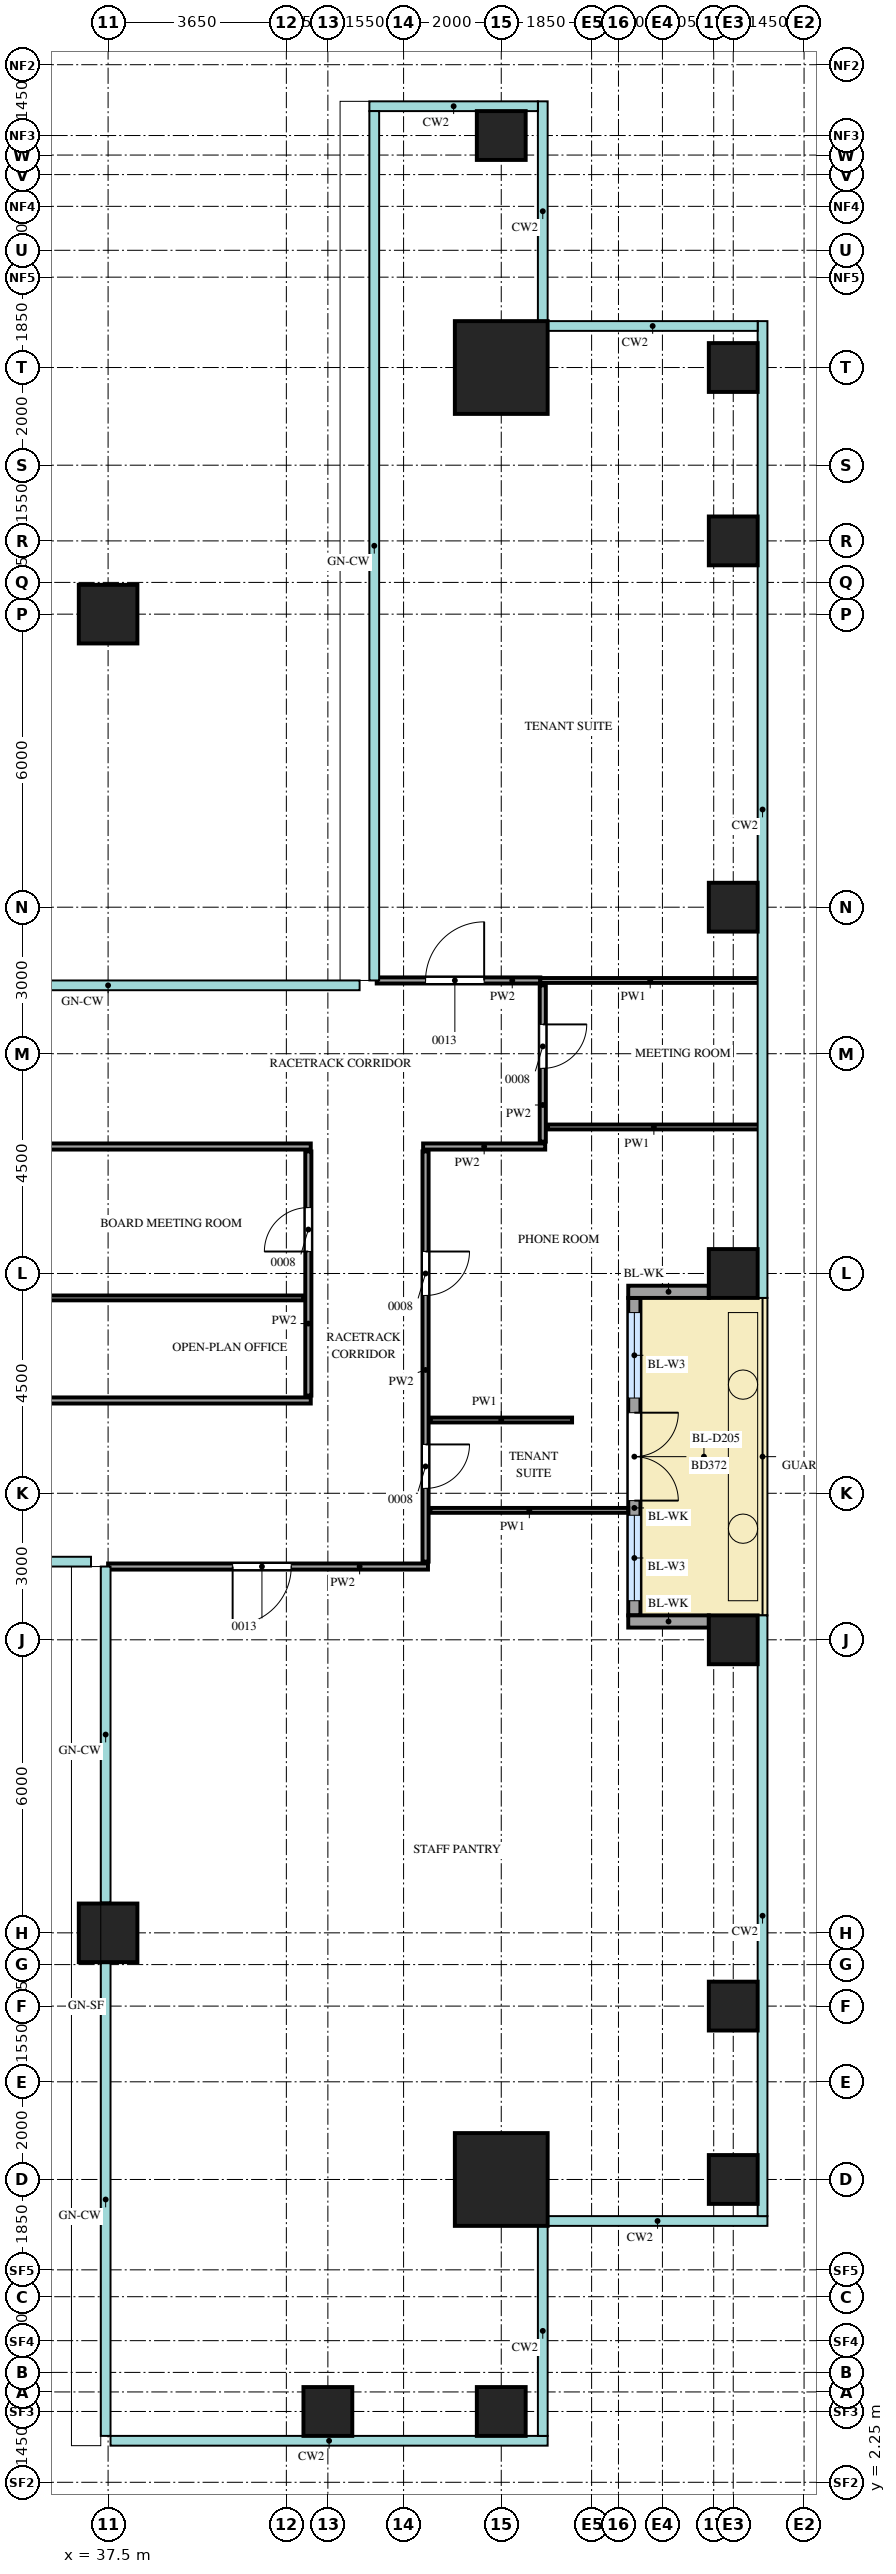
"""IFC4 building model, lengths in metres.
Left out: names, types, materials, properties, quantities, classifications, styles, units other than length and angle.
Written with IfcOpenShell. Run it as: python <this file> out.ifc"""

import sys

from ifc_helpers import new_model, si_unit, direction, frame, frame_2d, origin, origin_2d, place, context, subcontext, project, spatial, rectangle, extrude, source, transform, mapped, element, fill, save


model = new_model("IFC4")
c1 = context("Model", 3, precision=1e-05, world=origin(), true_north=direction((0.0, 1.0)))
c2 = subcontext(c1, "Body", "Model", "MODEL_VIEW")
j1 = project(units=[si_unit("LENGTHUNIT", "METRE"), si_unit("PLANEANGLEUNIT", "RADIAN")], contexts=[c1])
p1 = place(None, origin())
s1 = spatial("IfcSite", under=j1, at=p1, CompositionType="ELEMENT")
p2 = place(p1, origin())
s2 = spatial("IfcBuilding", under=s1, at=p2, CompositionType="ELEMENT")
p3 = place(p2, frame((0.0, 0.0, 172.7)))
s3 = spatial("IfcBuildingStorey", under=s2, at=p3, CompositionType="ELEMENT", Elevation=172.7)
m1 = source(origin(), c2, "Body", "SweptSolid", [
    extrude(rectangle(XDim=1.9, YDim=1.9, at=origin_2d()), origin(), (0.0, 0.0, 1.0), 4.0),
])
for number, where, z_axis, x_axis in (
    (1, (45.55, 45.55, 0.0), (0.0, 0.0, 1.0), (1.0, 0.0, 0.0)),
    (2, (45.55, 8.45, 0.0), (0.0, 0.0, 1.0), (1.0, 0.0, 0.0)),
):
    element("IfcColumn", number, at=place(p3, frame(where, z_axis=z_axis, x_axis=x_axis)), inside=s3, PredefinedType="COLUMN", context=c2, shape_type="MappedRepresentation", body=[
        mapped(m1, transform((0.0, 0.0, 0.0))),
    ])
m2 = source(origin(), c2, "Body", "SweptSolid", [
    extrude(rectangle(XDim=1.0, YDim=1.0, at=origin_2d()), origin(), (0.0, 0.0, 1.0), 3.75),
])
for number, where, z_axis, x_axis in (
    (3, (42.0, 3.7, 0.0), (0.0, 0.0, 1.0), (1.0, 0.0, 0.0)),
    (4, (45.55, 3.7, 0.0), (0.0, 0.0, 1.0), (1.0, 0.0, 0.0)),
    (5, (50.3, 8.45, 0.0), (0.0, 0.0, 1.0), (1.0, 0.0, 0.0)),
    (6, (50.3, 12.0, 0.0), (0.0, 0.0, 1.0), (1.0, 0.0, 0.0)),
    (7, (50.3, 19.5, 0.0), (0.0, 0.0, 1.0), (1.0, 0.0, 0.0)),
    (8, (50.3, 27.0, 0.0), (0.0, 0.0, 1.0), (1.0, 0.0, 0.0)),
    (9, (50.3, 34.5, 0.0), (0.0, 0.0, 1.0), (1.0, 0.0, 0.0)),
    (10, (50.3, 42.0, 0.0), (0.0, 0.0, 1.0), (1.0, 0.0, 0.0)),
    (11, (50.3, 45.55, 0.0), (0.0, 0.0, 1.0), (1.0, 0.0, 0.0)),
    (12, (45.55, 50.3, 0.0), (0.0, 0.0, 1.0), (1.0, 0.0, 0.0)),
):
    element("IfcColumn", number, at=place(p3, frame(where, z_axis=z_axis, x_axis=x_axis)), inside=s3, PredefinedType="COLUMN", context=c2, shape_type="MappedRepresentation", body=[
        mapped(m2, transform((0.0, 0.0, 0.0))),
    ])
m3 = source(origin(), c2, "Body", "SweptSolid", [
    extrude(rectangle(XDim=1.2, YDim=1.2, at=origin_2d()), origin(), (0.0, 0.0, 1.0), 3.75),
])
p4 = place(p3, frame((37.5, 13.5, 0.0), z_axis=(0.0, 0.0, 1.0), x_axis=(1.0, 0.0, 0.0)))
e13 = element("IfcColumn", 13, at=p4, inside=s3, PredefinedType="COLUMN", context=c2, shape_type="MappedRepresentation", body=[
    mapped(m3, transform((0.0, 0.0, 0.0))),
])
m4 = source(origin(), c2, "Body", "SweptSolid", [
    extrude(rectangle(XDim=1.2, YDim=1.2, at=origin_2d()), origin(), (0.0, 0.0, 1.0), 4.0),
])
p5 = place(p3, frame((37.5, 40.5, 0.0), z_axis=(0.0, 0.0, 1.0), x_axis=(1.0, 0.0, 0.0)))
e14 = element("IfcColumn", 14, at=p5, inside=s3, PredefinedType="COLUMN", context=c2, shape_type="MappedRepresentation", body=[
    mapped(m4, transform((0.0, 0.0, 0.0))),
])
m5 = source(origin(), c2, "Body", "SweptSolid", [
    extrude(rectangle(XDim=6.5, YDim=0.25, at=frame_2d((3.25, 0.0))), origin(), (0.0, 0.0, 1.0), 3.15),
])
p6 = place(p3, frame((48.275, 20.0, 0.0), z_axis=(0.0, 0.0, 1.0), x_axis=(0.0, 1.0, 0.0)))
e15 = element("IfcWall", 15, at=p6, inside=s3, PredefinedType="SOLIDWALL", context=c2, shape_type="MappedRepresentation", body=[
    mapped(m5, transform((0.0, 0.0, 0.0))),
])
m6 = source(origin(), c2, "Body", "SweptSolid", [
    extrude(rectangle(XDim=1.75, YDim=2.4, at=frame_2d((0.875, 1.2))), frame((0.0, 0.135, 0.0), z_axis=(0.0, -1.0, 0.0), x_axis=(1.0, 0.0, 0.0)), (0.0, 0.0, 1.0), 0.27),
])
p7 = place(p6, frame((0.3, 0.0, 0.0)))
e16 = element("IfcOpeningElement", 16, at=p7, cuts=e15, PredefinedType="OPENING", context=c2, shape_type="MappedRepresentation", body=[
    mapped(m6, transform((0.0, 0.0, 0.0))),
])
p8 = place(p6, frame((4.45, 0.0, 0.0)))
e17 = element("IfcOpeningElement", 17, at=p8, cuts=e15, PredefinedType="OPENING", context=c2, shape_type="MappedRepresentation", body=[
    mapped(m6, transform((0.0, 0.0, 0.0))),
])
m7 = source(origin(), c2, "Body", "SweptSolid", [
    extrude(rectangle(XDim=1.8, YDim=2.4, at=frame_2d((0.9, 1.2))), frame((0.0, 0.135, 0.0), z_axis=(0.0, -1.0, 0.0), x_axis=(1.0, 0.0, 0.0)), (0.0, 0.0, 1.0), 0.27),
])
p9 = place(p6, frame((2.35, 0.0, 0.0)))
e18 = element("IfcOpeningElement", 18, at=p9, cuts=e15, PredefinedType="OPENING", context=c2, shape_type="MappedRepresentation", body=[
    mapped(m7, transform((0.0, 0.0, 0.0))),
])
m8 = source(origin(), c2, "Body", "SweptSolid", [
    extrude(rectangle(XDim=1.65, YDim=0.25, at=frame_2d((0.825, 0.0))), origin(), (0.0, 0.0, 1.0), 3.15),
])
for number, where, z_axis, x_axis in (
    (19, (49.8, 19.875, 0.0), (0.0, 0.0, 1.0), (-1.0, 0.0, 0.0)),
    (20, (49.8, 26.625, 0.0), (0.0, 0.0, 1.0), (-1.0, 0.0, 0.0)),
):
    element("IfcWall", number, at=place(p3, frame(where, z_axis=z_axis, x_axis=x_axis)), inside=s3, PredefinedType="SOLIDWALL", context=c2, shape_type="MappedRepresentation", body=[
        mapped(m8, transform((0.0, 0.0, 0.0))),
    ])
m9 = source(origin(), c2, "Body", "SweptSolid", [
    extrude(rectangle(XDim=6.55, YDim=0.125, at=frame_2d((3.275, 0.0))), origin(), (0.0, 0.0, 1.0), 3.8),
])
p10 = place(p3, frame((37.5, 21.0, 0.0), z_axis=(0.0, 0.0, 1.0), x_axis=(1.0, 0.0, 0.0)))
e21 = element("IfcWall", 21, at=p10, inside=s3, PredefinedType="PARTITIONING", context=c2, shape_type="MappedRepresentation", body=[
    mapped(m9, transform((0.0, 0.0, 0.0))),
])
m10 = source(origin(), c2, "Body", "SweptSolid", [
    extrude(rectangle(XDim=1.2, YDim=2.1, at=frame_2d((0.6, 1.05))), frame((0.0, 0.073, 0.0), z_axis=(0.0, -1.0, 0.0), x_axis=(1.0, 0.0, 0.0)), (0.0, 0.0, 1.0), 0.145),
])
p11 = place(p10, frame((2.55, 0.0, 0.0)))
e22 = element("IfcOpeningElement", 22, at=p11, cuts=e21, PredefinedType="OPENING", context=c2, shape_type="MappedRepresentation", body=[
    mapped(m10, transform((0.0, 0.0, 0.0))),
])
m11 = source(origin(), c2, "Body", "SweptSolid", [
    extrude(rectangle(XDim=8.4, YDim=0.125, at=frame_2d((4.2, 0.0))), origin(), (0.0, 0.0, 1.0), 3.8),
])
p12 = place(p3, frame((44.0, 21.1, 0.0), z_axis=(0.0, 0.0, 1.0), x_axis=(0.0, 1.0, 0.0)))
e23 = element("IfcWall", 23, at=p12, inside=s3, PredefinedType="PARTITIONING", context=c2, shape_type="MappedRepresentation", body=[
    mapped(m11, transform((0.0, 0.0, 0.0))),
])
m12 = source(origin(), c2, "Body", "SweptSolid", [
    extrude(rectangle(XDim=0.9, YDim=2.1, at=frame_2d((0.45, 1.05))), frame((0.0, 0.073, 0.0), z_axis=(0.0, -1.0, 0.0), x_axis=(1.0, 0.0, 0.0)), (0.0, 0.0, 1.0), 0.145),
])
p13 = place(p12, frame((1.5, 0.0, 0.0)))
e24 = element("IfcOpeningElement", 24, at=p13, cuts=e23, PredefinedType="OPENING", context=c2, shape_type="MappedRepresentation", body=[
    mapped(m12, transform((0.0, 0.0, 0.0))),
])
p14 = place(p12, frame((5.45, 0.0, 0.0)))
e25 = element("IfcOpeningElement", 25, at=p14, cuts=e23, PredefinedType="OPENING", context=c2, shape_type="MappedRepresentation", body=[
    mapped(m12, transform((0.0, 0.0, 0.0))),
])
m13 = source(origin(), c2, "Body", "SweptSolid", [
    extrude(rectangle(XDim=4.05, YDim=0.1, at=frame_2d((2.025, 0.0))), origin(), (0.0, 0.0, 1.0), 3.8),
])
p15 = place(p3, frame((44.1, 22.15, 0.0), z_axis=(0.0, 0.0, 1.0), x_axis=(1.0, 0.0, 0.0)))
e26 = element("IfcWall", 26, at=p15, inside=s3, PredefinedType="PARTITIONING", context=c2, shape_type="MappedRepresentation", body=[
    mapped(m13, transform((0.0, 0.0, 0.0))),
])
m14 = source(origin(), c2, "Body", "SweptSolid", [
    extrude(rectangle(XDim=2.9, YDim=0.1, at=frame_2d((1.45, 0.0))), origin(), (0.0, 0.0, 1.0), 3.8),
])
p16 = place(p3, frame((44.1, 24.0, 0.0), z_axis=(0.0, 0.0, 1.0), x_axis=(1.0, 0.0, 0.0)))
e27 = element("IfcWall", 27, at=p16, inside=s3, PredefinedType="PARTITIONING", context=c2, shape_type="MappedRepresentation", body=[
    mapped(m14, transform((0.0, 0.0, 0.0))),
])
m15 = source(origin(), c2, "Body", "SweptSolid", [
    extrude(rectangle(XDim=18.3, YDim=0.125, at=frame_2d((9.15, 0.0))), origin(), (0.0, 0.0, 1.0), 3.8),
])
p17 = place(p3, frame((23.35, 24.4, 0.0), z_axis=(0.0, 0.0, 1.0), x_axis=(1.0, 0.0, 0.0)))
e28 = element("IfcWall", 28, at=p17, inside=s3, PredefinedType="PARTITIONING", context=c2, shape_type="MappedRepresentation", body=[
    mapped(m15, transform((0.0, 0.0, 0.0))),
])
m16 = source(origin(), c2, "Body", "SweptSolid", [
    extrude(rectangle(XDim=5.0, YDim=0.125, at=frame_2d((2.5, 0.0))), origin(), (0.0, 0.0, 1.0), 3.8),
])
p18 = place(p3, frame((41.6, 24.5, 0.0), z_axis=(0.0, 0.0, 1.0), x_axis=(0.0, 1.0, 0.0)))
e29 = element("IfcWall", 29, at=p18, inside=s3, PredefinedType="PARTITIONING", context=c2, shape_type="MappedRepresentation", body=[
    mapped(m16, transform((0.0, 0.0, 0.0))),
])
p19 = place(p18, frame((2.95, 0.0, 0.0)))
e30 = element("IfcOpeningElement", 30, at=p19, cuts=e29, PredefinedType="OPENING", context=c2, shape_type="MappedRepresentation", body=[
    mapped(m12, transform((0.0, 0.0, 0.0))),
])
m17 = source(origin(), c2, "Body", "SweptSolid", [
    extrude(rectangle(XDim=18.0, YDim=0.1, at=frame_2d((9.0, 0.0))), origin(), (0.0, 0.0, 1.0), 3.8),
])
p20 = place(p3, frame((23.5, 26.5, 0.0), z_axis=(0.0, 0.0, 1.0), x_axis=(1.0, 0.0, 0.0)))
e31 = element("IfcWall", 31, at=p20, inside=s3, PredefinedType="PARTITIONING", context=c2, shape_type="MappedRepresentation", body=[
    mapped(m17, transform((0.0, 0.0, 0.0))),
])
p21 = place(p3, frame((23.35, 29.6, 0.0), z_axis=(0.0, 0.0, 1.0), x_axis=(1.0, 0.0, 0.0)))
e32 = element("IfcWall", 32, at=p21, inside=s3, PredefinedType="PARTITIONING", context=c2, shape_type="MappedRepresentation", body=[
    mapped(m15, transform((0.0, 0.0, 0.0))),
])
m18 = source(origin(), c2, "Body", "SweptSolid", [
    extrude(rectangle(XDim=2.5, YDim=0.125, at=frame_2d((1.25, 0.0))), origin(), (0.0, 0.0, 1.0), 3.8),
])
p22 = place(p3, frame((43.95, 29.6, 0.0), z_axis=(0.0, 0.0, 1.0), x_axis=(1.0, 0.0, 0.0)))
e33 = element("IfcWall", 33, at=p22, inside=s3, PredefinedType="PARTITIONING", context=c2, shape_type="MappedRepresentation", body=[
    mapped(m18, transform((0.0, 0.0, 0.0))),
])
m19 = source(origin(), c2, "Body", "SweptSolid", [
    extrude(rectangle(XDim=3.2, YDim=0.125, at=frame_2d((1.6, 0.0))), origin(), (0.0, 0.0, 1.0), 3.8),
])
p23 = place(p3, frame((46.4, 29.7, 0.0), z_axis=(0.0, 0.0, 1.0), x_axis=(0.0, 1.0, 0.0)))
e34 = element("IfcWall", 34, at=p23, inside=s3, PredefinedType="PARTITIONING", context=c2, shape_type="MappedRepresentation", body=[
    mapped(m19, transform((0.0, 0.0, 0.0))),
])
p24 = place(p23, frame((1.5, 0.0, 0.0)))
e35 = element("IfcOpeningElement", 35, at=p24, cuts=e34, PredefinedType="OPENING", context=c2, shape_type="MappedRepresentation", body=[
    mapped(m12, transform((0.0, 0.0, 0.0))),
])
m20 = source(origin(), c2, "Body", "SweptSolid", [
    extrude(rectangle(XDim=4.35, YDim=0.1, at=frame_2d((2.175, 0.0))), origin(), (0.0, 0.0, 1.0), 3.8),
])
p25 = place(p3, frame((46.5, 30.0, 0.0), z_axis=(0.0, 0.0, 1.0), x_axis=(1.0, 0.0, 0.0)))
e36 = element("IfcWall", 36, at=p25, inside=s3, PredefinedType="PARTITIONING", context=c2, shape_type="MappedRepresentation", body=[
    mapped(m20, transform((0.0, 0.0, 0.0))),
])
m21 = source(origin(), c2, "Body", "SweptSolid", [
    extrude(rectangle(XDim=3.35, YDim=0.125, at=frame_2d((1.675, 0.0))), origin(), (0.0, 0.0, 1.0), 3.8),
])
p26 = place(p3, frame((43.0, 33.0, 0.0), z_axis=(0.0, 0.0, 1.0), x_axis=(1.0, 0.0, 0.0)))
e37 = element("IfcWall", 37, at=p26, inside=s3, PredefinedType="PARTITIONING", context=c2, shape_type="MappedRepresentation", body=[
    mapped(m21, transform((0.0, 0.0, 0.0))),
])
p27 = place(p26, frame((1.0, 0.0, 0.0)))
e38 = element("IfcOpeningElement", 38, at=p27, cuts=e37, PredefinedType="OPENING", context=c2, shape_type="MappedRepresentation", body=[
    mapped(m10, transform((0.0, 0.0, 0.0))),
])
m22 = source(origin(), c2, "Body", "SweptSolid", [
    extrude(rectangle(XDim=4.5, YDim=0.1, at=frame_2d((2.25, 0.0))), origin(), (0.0, 0.0, 1.0), 3.8),
])
p28 = place(p3, frame((46.35, 33.0, 0.0), z_axis=(0.0, 0.0, 1.0), x_axis=(1.0, 0.0, 0.0)))
e39 = element("IfcWall", 39, at=p28, inside=s3, PredefinedType="PARTITIONING", context=c2, shape_type="MappedRepresentation", body=[
    mapped(m22, transform((0.0, 0.0, 0.0))),
])
m23 = source(origin(), c2, "Body", "SweptSolid", [
    extrude(rectangle(XDim=1.75, YDim=2.4, at=frame_2d((0.875, 1.2))), frame((0.0, 0.03, 0.0), z_axis=(0.0, -1.0, 0.0), x_axis=(1.0, 0.0, 0.0)), (0.0, 0.0, 1.0), 0.06),
])
p29 = place(p7, origin())
e40 = element("IfcWindow", 40, at=p29, inside=s3, PartitioningType="SINGLE_PANEL", PredefinedType="WINDOW", context=c2, shape_type="MappedRepresentation", body=[
    mapped(m23, transform((0.0, 0.0, 0.0))),
])
fill(e16, e40)
p30 = place(p8, origin())
e41 = element("IfcWindow", 41, at=p30, inside=s3, PartitioningType="SINGLE_PANEL", PredefinedType="WINDOW", context=c2, shape_type="MappedRepresentation", body=[
    mapped(m23, transform((0.0, 0.0, 0.0))),
])
fill(e17, e41)
m24 = source(origin(), c2, "Body", "SweptSolid", [
    extrude(rectangle(XDim=1.8, YDim=2.4, at=frame_2d((0.9, 1.2))), frame((0.0, 0.025, 0.0), z_axis=(0.0, -1.0, 0.0), x_axis=(1.0, 0.0, 0.0)), (0.0, 0.0, 1.0), 0.05),
])
p31 = place(p9, origin())
e42 = element("IfcDoor", 42, at=p31, inside=s3, OperationType="DOUBLE_DOOR_DOUBLE_SWING", PredefinedType="DOOR", context=c2, shape_type="MappedRepresentation", body=[
    mapped(m24, transform((0.0, 0.0, 0.0))),
])
fill(e18, e42)
m25 = source(origin(), c2, "Body", "SweptSolid", [
    extrude(rectangle(XDim=1.2, YDim=2.1, at=frame_2d((0.6, 1.05))), frame((0.0, 0.025, 0.0), z_axis=(0.0, -1.0, 0.0), x_axis=(1.0, 0.0, 0.0)), (0.0, 0.0, 1.0), 0.05),
])
p32 = place(p11, origin())
e43 = element("IfcDoor", 43, at=p32, inside=s3, OperationType="SINGLE_SWING_LEFT", PredefinedType="DOOR", context=c2, shape_type="MappedRepresentation", body=[
    mapped(m25, transform((0.0, 0.0, 0.0))),
])
fill(e22, e43)
p33 = place(p27, origin())
e44 = element("IfcDoor", 44, at=p33, inside=s3, OperationType="SINGLE_SWING_LEFT", PredefinedType="DOOR", context=c2, shape_type="MappedRepresentation", body=[
    mapped(m25, transform((0.0, 0.0, 0.0))),
])
fill(e38, e44)
m26 = source(origin(), c2, "Body", "SweptSolid", [
    extrude(rectangle(XDim=0.9, YDim=2.1, at=frame_2d((0.45, 1.05))), frame((0.0, 0.025, 0.0), z_axis=(0.0, -1.0, 0.0), x_axis=(1.0, 0.0, 0.0)), (0.0, 0.0, 1.0), 0.05),
])
p34 = place(p13, origin())
e45 = element("IfcDoor", 45, at=p34, inside=s3, OperationType="SINGLE_SWING_RIGHT", PredefinedType="DOOR", context=c2, shape_type="MappedRepresentation", body=[
    mapped(m26, transform((0.0, 0.0, 0.0))),
])
fill(e24, e45)
p35 = place(p14, origin())
e46 = element("IfcDoor", 46, at=p35, inside=s3, OperationType="SINGLE_SWING_RIGHT", PredefinedType="DOOR", context=c2, shape_type="MappedRepresentation", body=[
    mapped(m26, transform((0.0, 0.0, 0.0))),
])
fill(e25, e46)
p36 = place(p24, origin())
e47 = element("IfcDoor", 47, at=p36, inside=s3, OperationType="SINGLE_SWING_RIGHT", PredefinedType="DOOR", context=c2, shape_type="MappedRepresentation", body=[
    mapped(m26, transform((0.0, 0.0, 0.0))),
])
fill(e35, e47)
p37 = place(p19, origin())
e48 = element("IfcDoor", 48, at=p37, inside=s3, OperationType="SINGLE_SWING_RIGHT", PredefinedType="DOOR", context=c2, shape_type="MappedRepresentation", body=[
    mapped(m26, transform((0.0, 0.0, 0.0))),
])
fill(e30, e48)
save(model, sys.argv[1])
